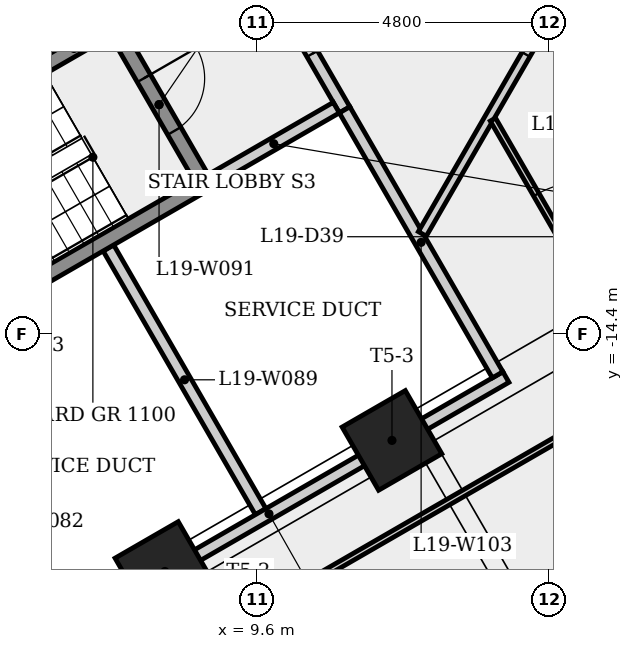
"""IFC4 building model, lengths in metres.
Left out: names, types, materials, properties, quantities, classifications, styles, units other than length and angle.
Written with IfcOpenShell. Run it as: python <this file> out.ifc"""

import sys

from ifc_helpers import new_model, si_unit, direction, frame, frame_2d, origin, origin_2d, place, context, subcontext, project, spatial, rectangle, extrude, element, fill, save


model = new_model("IFC4")
c1 = context("Model", 3, precision=1e-05, world=origin(), true_north=direction((0.0, 1.0)))
c2 = subcontext(c1, "Body", "Model", "MODEL_VIEW")
j1 = project(units=[si_unit("LENGTHUNIT", "METRE"), si_unit("PLANEANGLEUNIT", "RADIAN")], contexts=[c1])
p1 = place(None, origin())
s1 = spatial("IfcSite", under=j1, at=p1, CompositionType="ELEMENT")
p2 = place(p1, origin())
s2 = spatial("IfcBuilding", under=s1, at=p2, CompositionType="ELEMENT")
p3 = place(p2, frame((0.0, 0.0, 74.3)))
s3 = spatial("IfcBuildingStorey", under=s2, at=p3, CompositionType="ELEMENT", Elevation=74.3)
p4 = place(p3, frame((-0.2, -10.623, 0.0), z_axis=(0.0, 0.0, 1.0), x_axis=(0.866023993627, 0.500002442456, 0.0)))
e1 = element("IfcWall", 1, at=p4, inside=s3, PredefinedType="SHEAR", context=c2, shape_type="SweptSolid", body=[
    extrude(rectangle(XDim=10.97, YDim=0.8, at=frame_2d((5.485, 0.0))), origin(), (0.0, 0.0, 1.0), 4.0),
])
p5 = place(p4, frame((7.108, 0.0, 0.0)))
e2 = element("IfcOpeningElement", 2, at=p5, cuts=e1, PredefinedType="OPENING", context=c2, shape_type="SweptSolid", body=[
    extrude(rectangle(XDim=0.9, YDim=2.1, at=frame_2d((0.45, 1.05))), frame((0.0, 0.41, 0.0), z_axis=(0.0, -1.0, 0.0), x_axis=(1.0, 0.0, 0.0)), (0.0, 0.0, 1.0), 0.82),
])
for number, where, z_axis, x_axis in (
    (3, (8.082, -18.31, 0.0), (0.0, 0.0, 1.0), (0.5, -0.866, 0.0)),
    (4, (11.816, -16.154, 0.0), (0.0, 0.0, 1.0), (0.5, -0.866, 0.0)),
):
    element("IfcColumn", number, at=place(p3, frame(where, z_axis=z_axis, x_axis=x_axis)), inside=s3, PredefinedType="COLUMN", context=c2, shape_type="SweptSolid", body=[
        extrude(rectangle(XDim=1.2, YDim=1.2, at=origin_2d()), origin(), (0.0, 0.0, 1.0), 4.0),
    ])
p6 = place(p3, frame((1.585, -12.595, 0.0), z_axis=(0.0, 0.0, 1.0), x_axis=(0.866036417653, 0.499980922934, 0.0)))
e5 = element("IfcWall", 5, at=p6, inside=s3, PredefinedType="SHEAR", context=c2, shape_type="SweptSolid", body=[
    extrude(rectangle(XDim=6.65, YDim=0.25, at=frame_2d((3.325, 0.0))), origin(), (0.0, 0.0, 1.0), 3.6),
])
p7 = place(p6, frame((5.275, 0.0, 0.0)))
e6 = element("IfcOpeningElement", 6, at=p7, cuts=e5, PredefinedType="OPENING", context=c2, shape_type="SweptSolid", body=[
    extrude(rectangle(XDim=1.0, YDim=2.1, at=frame_2d((0.5, 1.05))), frame((0.0, 0.135, 0.0), z_axis=(0.0, -1.0, 0.0), x_axis=(1.0, 0.0, 0.0)), (0.0, 0.0, 1.0), 0.27),
])
p8 = place(p3, frame((7.153, -12.989, 0.0), z_axis=(0.0, 0.0, 1.0), x_axis=(0.499998165157, -0.866026463129, 0.0)))
e7 = element("IfcWall", 7, at=p8, inside=s3, PredefinedType="PLUMBINGWALL", context=c2, shape_type="SweptSolid", body=[
    extrude(rectangle(XDim=5.008, YDim=0.2, at=frame_2d((2.504, 0.0))), origin(), (0.0, 0.0, 1.0), 3.6),
])
p9 = place(p3, frame((3.301, -15.068, 0.0), z_axis=(0.0, 0.0, 1.0), x_axis=(0.866035036182, 0.499983315828, 0.0)))
e8 = element("IfcWall", 8, at=p9, inside=s3, PredefinedType="SHEAR", context=c2, shape_type="SweptSolid", body=[
    extrude(rectangle(XDim=6.4, YDim=0.25, at=frame_2d((3.2, 0.0))), origin(), (0.0, 0.0, 1.0), 4.0),
])
p10 = place(p3, frame((7.298, -9.441, 0.0), z_axis=(0.0, 0.0, 1.0), x_axis=(0.500034990121, -0.866005201286, 0.0)))
e9 = element("IfcWall", 9, at=p10, inside=s3, PredefinedType="SHEAR", context=c2, shape_type="SweptSolid", body=[
    extrude(rectangle(XDim=2.75, YDim=0.25, at=frame_2d((1.375, 0.0))), origin(), (0.0, 0.0, 1.0), 3.6),
])
p11 = place(p10, frame((0.875, 0.0, 0.0)))
e10 = element("IfcOpeningElement", 10, at=p11, cuts=e9, PredefinedType="OPENING", context=c2, shape_type="SweptSolid", body=[
    extrude(rectangle(XDim=1.0, YDim=2.1, at=frame_2d((0.5, 1.05))), frame((0.0, 0.135, 0.0), z_axis=(0.0, -1.0, 0.0), x_axis=(1.0, 0.0, 0.0)), (0.0, 0.0, 1.0), 0.27),
])
p12 = place(p3, frame((9.537, -8.119, 0.0), z_axis=(0.0, 0.0, 1.0), x_axis=(0.499990139034, -0.866031096941, 0.0)))
e11 = element("IfcWall", 11, at=p12, inside=s3, PredefinedType="PARTITIONING", context=c2, shape_type="SweptSolid", body=[
    extrude(rectangle(XDim=3.0, YDim=0.2, at=frame_2d((1.5, 0.0))), origin(), (0.0, 0.0, 1.0), 3.6),
])
p13 = place(p12, frame((0.935, 0.0, 0.0)))
e12 = element("IfcOpeningElement", 12, at=p13, cuts=e11, PredefinedType="OPENING", context=c2, shape_type="SweptSolid", body=[
    extrude(rectangle(XDim=1.0, YDim=2.1, at=frame_2d((0.5, 1.05))), frame((0.0, 0.11, 0.0), z_axis=(0.0, -1.0, 0.0), x_axis=(1.0, 0.0, 0.0)), (0.0, 0.0, 1.0), 0.22),
])
p14 = place(p3, frame((5.896, -19.612, 0.0), z_axis=(0.0, 0.0, 1.0), x_axis=(0.866024315419, 0.5000018851, 0.0)))
e13 = element("IfcWall", 13, at=p14, inside=s3, PredefinedType="PLUMBINGWALL", context=c2, shape_type="SweptSolid", body=[
    extrude(rectangle(XDim=9.0, YDim=0.2, at=frame_2d((4.5, 0.0))), origin(), (0.0, 0.0, 1.0), 2.675),
])
p15 = place(p3, frame((10.901, -10.681, 0.0), z_axis=(0.0, 0.0, 1.0), x_axis=(-0.866007538022, -0.500030943131, 0.0)))
e14 = element("IfcWall", 14, at=p15, inside=s3, PredefinedType="PLUMBINGWALL", context=c2, shape_type="SweptSolid", body=[
    extrude(rectangle(XDim=2.375, YDim=0.2, at=frame_2d((1.188, 0.0))), origin(), (0.0, 0.0, 1.0), 3.6),
])
p16 = place(p3, frame((11.037, -10.717, 0.0), z_axis=(0.0, 0.0, 1.0), x_axis=(0.500005202617, -0.866022400031, 0.0)))
e15 = element("IfcWall", 15, at=p16, inside=s3, PredefinedType="PLUMBINGWALL", context=c2, shape_type="SweptSolid", body=[
    extrude(rectangle(XDim=5.033, YDim=0.2, at=frame_2d((2.516, 0.0))), origin(), (0.0, 0.0, 1.0), 3.6),
])
p17 = place(p3, frame((12.315, -12.758, 0.0), z_axis=(0.0, 0.0, 1.0), x_axis=(0.499989712218, 0.866031343357, 0.0)))
e16 = element("IfcWall", 16, at=p17, inside=s3, PredefinedType="PARTITIONING", context=c2, shape_type="SweptSolid", body=[
    extrude(rectangle(XDim=8.224, YDim=0.15, at=frame_2d((4.112, 0.0))), origin(), (0.0, 0.0, 1.0), 3.6),
])
p18 = place(p17, frame((3.408, 0.0, 0.0)))
e17 = element("IfcOpeningElement", 17, at=p18, cuts=e16, PredefinedType="OPENING", context=c2, shape_type="SweptSolid", body=[
    extrude(rectangle(XDim=1.6, YDim=2.1, at=frame_2d((0.8, 1.05))), frame((0.0, 0.085, 0.0), z_axis=(0.0, -1.0, 0.0), x_axis=(1.0, 0.0, 0.0)), (0.0, 0.0, 1.0), 0.17),
])
p19 = place(p3, frame((15.974, -15.302, 0.0), z_axis=(0.0, 0.0, 1.0), x_axis=(-0.866022405705, -0.500005192789, 0.0)))
e18 = element("IfcWall", 18, at=p19, inside=s3, PredefinedType="PARTITIONING", context=c2, shape_type="SweptSolid", body=[
    extrude(rectangle(XDim=28.179, YDim=0.1, at=frame_2d((14.089, 0.0))), origin(), (0.0, 0.0, 1.0), 3.6),
])
p20 = place(p3, frame((13.476, -10.876, 0.0), z_axis=(0.0, 0.0, 1.0), x_axis=(0.500008654708, -0.866020406929, 0.0)))
e19 = element("IfcWall", 19, at=p20, inside=s3, PredefinedType="PARTITIONING", context=c2, shape_type="SweptSolid", body=[
    extrude(rectangle(XDim=20.011, YDim=0.1, at=frame_2d((10.005, 0.0))), origin(), (0.0, 0.0, 1.0), 3.6),
])
p21 = place(p20, frame((16.88, 0.0, 0.0)))
e20 = element("IfcOpeningElement", 20, at=p21, cuts=e19, PredefinedType="OPENING", context=c2, shape_type="SweptSolid", body=[
    extrude(rectangle(XDim=1.6, YDim=2.1, at=frame_2d((0.8, 1.05))), frame((0.0, 0.06, 0.0), z_axis=(0.0, -1.0, 0.0), x_axis=(1.0, 0.0, 0.0)), (0.0, 0.0, 1.0), 0.12),
])
p22 = place(p20, frame((1.426, 0.0, 0.0)))
e21 = element("IfcOpeningElement", 21, at=p22, cuts=e19, PredefinedType="OPENING", context=c2, shape_type="SweptSolid", body=[
    extrude(rectangle(XDim=1.6, YDim=2.1, at=frame_2d((0.8, 1.05))), frame((0.0, 0.06, 0.0), z_axis=(0.0, -1.0, 0.0), x_axis=(1.0, 0.0, 0.0)), (0.0, 0.0, 1.0), 0.12),
])
p23 = place(p20, frame((6.092, 0.0, 0.0)))
e22 = element("IfcOpeningElement", 22, at=p23, cuts=e19, PredefinedType="OPENING", context=c2, shape_type="SweptSolid", body=[
    extrude(rectangle(XDim=1.6, YDim=2.1, at=frame_2d((0.8, 1.05))), frame((0.0, 0.06, 0.0), z_axis=(0.0, -1.0, 0.0), x_axis=(1.0, 0.0, 0.0)), (0.0, 0.0, 1.0), 0.12),
])
p24 = place(p20, frame((9.713, 0.0, 0.0)))
e23 = element("IfcOpeningElement", 23, at=p24, cuts=e19, PredefinedType="OPENING", context=c2, shape_type="SweptSolid", body=[
    extrude(rectangle(XDim=1.6, YDim=2.1, at=frame_2d((0.8, 1.05))), frame((0.0, 0.06, 0.0), z_axis=(0.0, -1.0, 0.0), x_axis=(1.0, 0.0, 0.0)), (0.0, 0.0, 1.0), 0.12),
])
p25 = place(p7, origin())
e24 = element("IfcDoor", 24, at=p25, inside=s3, OperationType="SINGLE_SWING_LEFT", PredefinedType="DOOR", context=c2, shape_type="SweptSolid", body=[
    extrude(rectangle(XDim=1.0, YDim=2.1, at=frame_2d((0.5, 1.05))), frame((0.0, 0.025, 0.0), z_axis=(0.0, -1.0, 0.0), x_axis=(1.0, 0.0, 0.0)), (0.0, 0.0, 1.0), 0.05),
])
fill(e6, e24)
p26 = place(p13, origin())
e25 = element("IfcDoor", 25, at=p26, inside=s3, OperationType="SINGLE_SWING_RIGHT", PredefinedType="DOOR", context=c2, shape_type="SweptSolid", body=[
    extrude(rectangle(XDim=1.0, YDim=2.1, at=frame_2d((0.5, 1.05))), frame((0.0, 0.025, 0.0), z_axis=(0.0, -1.0, 0.0), x_axis=(1.0, 0.0, 0.0)), (0.0, 0.0, 1.0), 0.05),
])
fill(e12, e25)
p27 = place(p11, origin())
e26 = element("IfcDoor", 26, at=p27, inside=s3, OperationType="SINGLE_SWING_LEFT", PredefinedType="DOOR", context=c2, shape_type="SweptSolid", body=[
    extrude(rectangle(XDim=1.0, YDim=2.1, at=frame_2d((0.5, 1.05))), frame((0.0, 0.025, 0.0), z_axis=(0.0, -1.0, 0.0), x_axis=(1.0, 0.0, 0.0)), (0.0, 0.0, 1.0), 0.05),
])
fill(e10, e26)
p28 = place(p18, origin())
e27 = element("IfcDoor", 27, at=p28, inside=s3, OperationType="SINGLE_SWING_RIGHT", PredefinedType="DOOR", context=c2, shape_type="SweptSolid", body=[
    extrude(rectangle(XDim=1.6, YDim=2.1, at=frame_2d((0.8, 1.05))), frame((0.0, 0.025, 0.0), z_axis=(0.0, -1.0, 0.0), x_axis=(1.0, 0.0, 0.0)), (0.0, 0.0, 1.0), 0.05),
])
fill(e17, e27)
p29 = place(p22, origin())
e28 = element("IfcDoor", 28, at=p29, inside=s3, OperationType="SINGLE_SWING_RIGHT", PredefinedType="DOOR", context=c2, shape_type="SweptSolid", body=[
    extrude(rectangle(XDim=1.6, YDim=2.1, at=frame_2d((0.8, 1.05))), frame((0.0, 0.025, 0.0), z_axis=(0.0, -1.0, 0.0), x_axis=(1.0, 0.0, 0.0)), (0.0, 0.0, 1.0), 0.05),
])
fill(e21, e28)
save(model, sys.argv[1])
